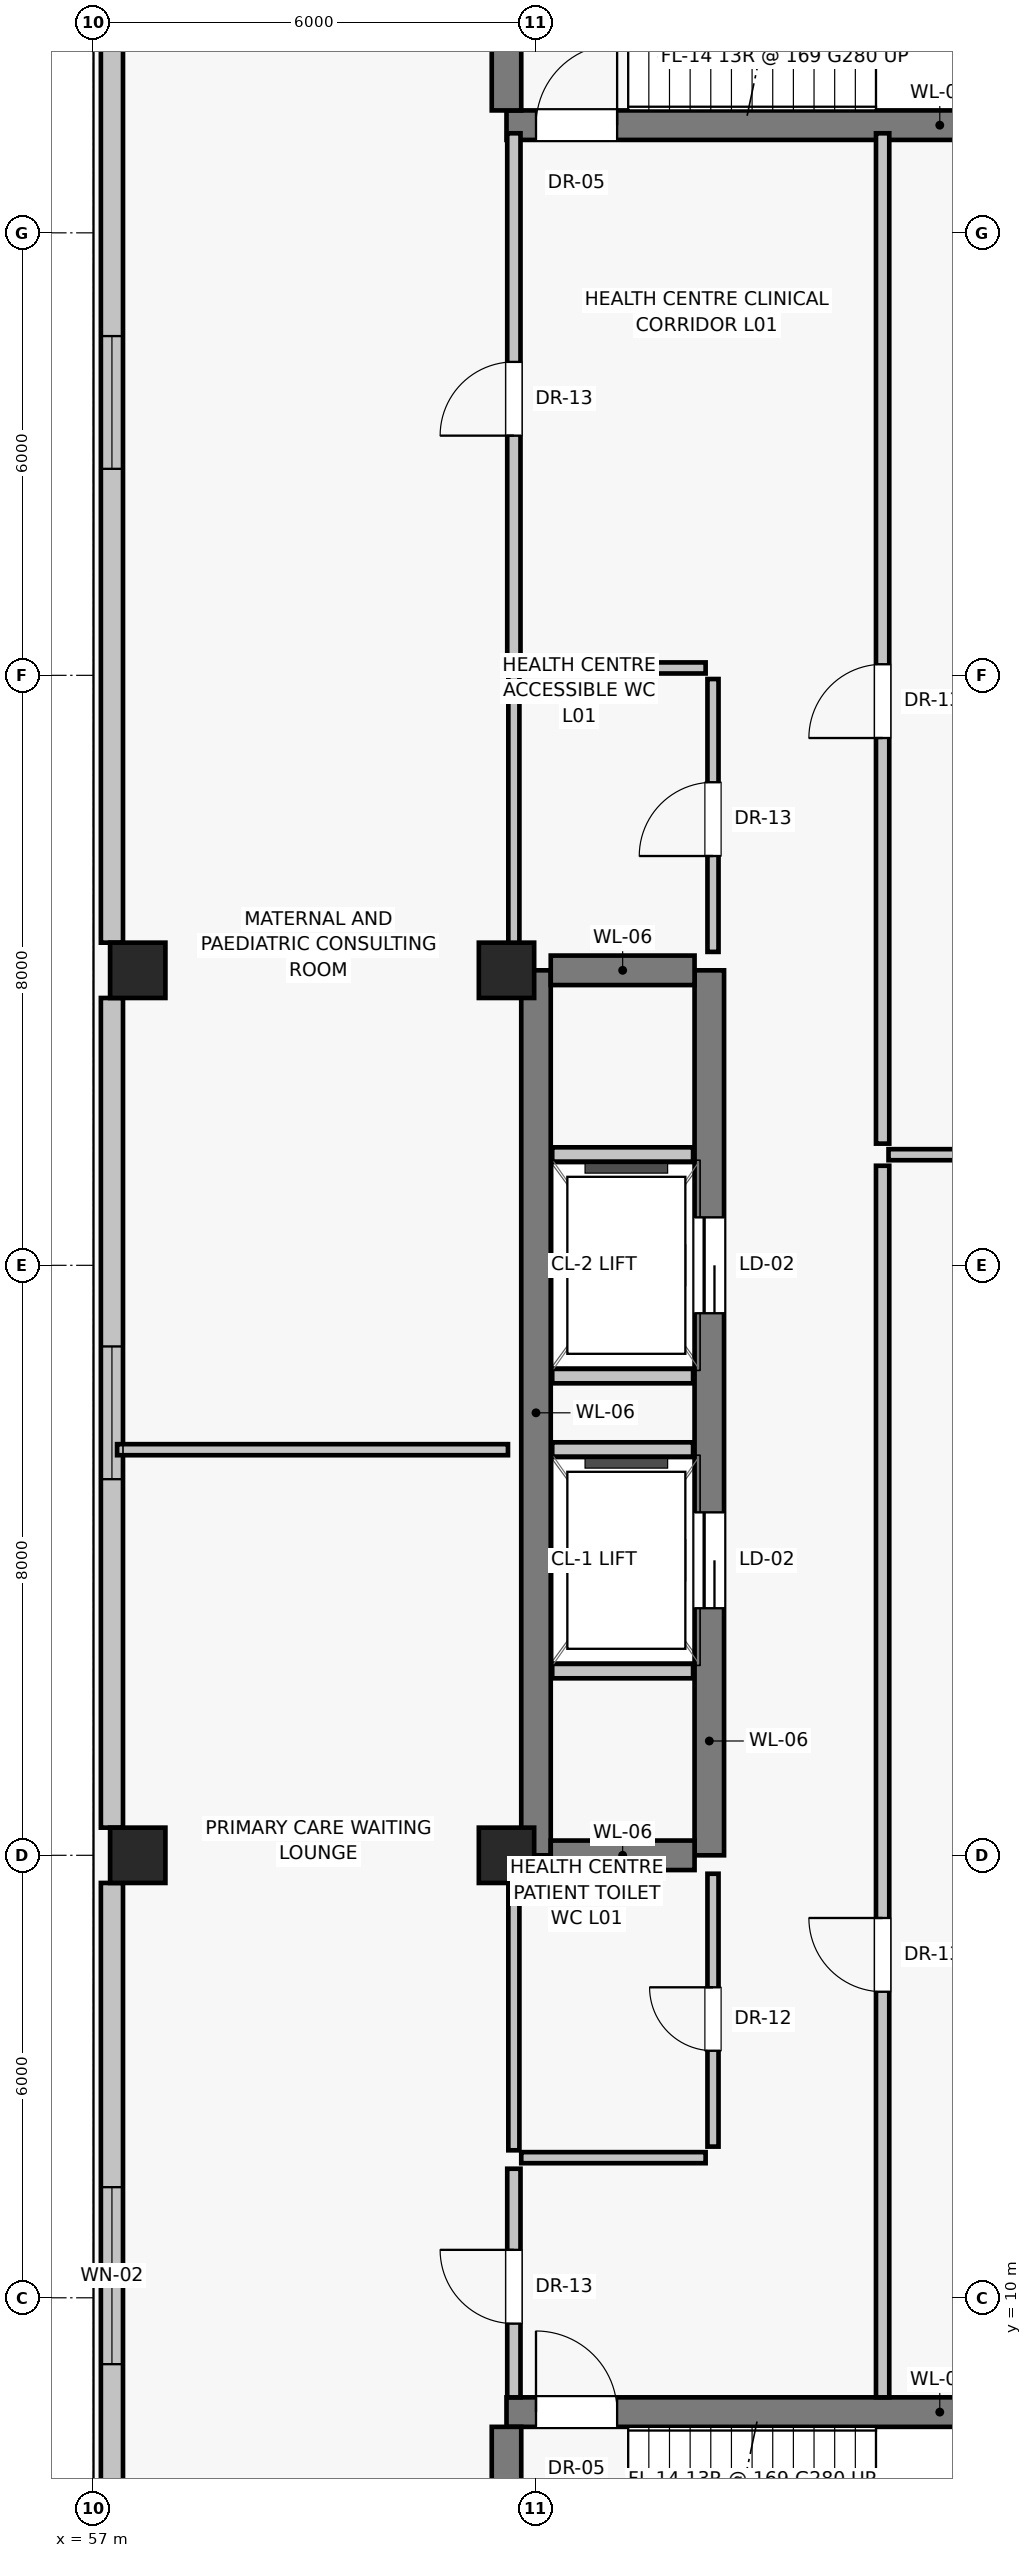
"""IFC4 building model, lengths in metres.
Left out: names, types, materials, properties, quantities, classifications, styles, units other than length and angle.
Written with IfcOpenShell. Run it as: python <this file> out.ifc"""

import sys

from ifc_helpers import new_model, si_unit, direction, frame, frame_2d, origin, origin_2d, place, context, subcontext, project, spatial, rectangle, extrude, source, transform, mapped, element, fill, save


model = new_model("IFC4")
c1 = context("Model", 3, precision=1e-05, world=origin(), true_north=direction((0.0, 1.0)))
c2 = subcontext(c1, "Body", "Model", "MODEL_VIEW")
j1 = project(units=[si_unit("LENGTHUNIT", "METRE"), si_unit("PLANEANGLEUNIT", "RADIAN")], contexts=[c1])
p1 = place(None, origin())
s1 = spatial("IfcSite", under=j1, at=p1, CompositionType="ELEMENT")
p2 = place(p1, origin())
s2 = spatial("IfcBuilding", under=s1, at=p2, CompositionType="ELEMENT")
p3 = place(p2, frame((0.0, 0.0, 5.2)))
s3 = spatial("IfcBuildingStorey", under=s2, at=p3, CompositionType="ELEMENT", Elevation=5.2)
for number, where, z_axis, x_axis in (
    (1, (57.6, 16.0, 0.0), (0.0, 0.0, 1.0), (1.0, 0.0, 0.0)),
    (2, (57.6, 28.0, 0.0), (0.0, 0.0, 1.0), (1.0, 0.0, 0.0)),
    (3, (62.6, 16.0, 0.0), (0.0, 0.0, 1.0), (1.0, 0.0, 0.0)),
    (4, (62.6, 28.0, 0.0), (0.0, 0.0, 1.0), (1.0, 0.0, 0.0)),
):
    element("IfcColumn", number, at=place(p3, frame(where, z_axis=z_axis, x_axis=x_axis)), inside=s3, PredefinedType="COLUMN", context=c2, shape_type="SweptSolid", body=[
        extrude(rectangle(XDim=0.75, YDim=0.75, at=origin_2d()), origin(), (0.0, 0.0, 1.0), 4.4),
    ])
p4 = place(p3, frame((57.25, 43.6, 0.0), z_axis=(0.0, 0.0, 1.0), x_axis=(0.0, -1.0, 0.0)))
e5 = element("IfcWall", 5, at=p4, inside=s3, PredefinedType="SOLIDWALL", context=c2, shape_type="SweptSolid", body=[
    extrude(rectangle(XDim=15.225, YDim=0.3, at=frame_2d((7.613, 0.0))), origin(), (0.0, 0.0, 1.0), 3.35),
])
p5 = place(p4, frame((7.0, 0.0, 0.85)))
e6 = element("IfcOpeningElement", 6, at=p5, cuts=e5, PredefinedType="OPENING", context=c2, shape_type="SweptSolid", body=[
    extrude(rectangle(XDim=1.8, YDim=1.65, at=frame_2d((0.9, 0.825))), frame((0.0, 0.16, 0.0), z_axis=(0.0, -1.0, 0.0), x_axis=(1.0, 0.0, 0.0)), (0.0, 0.0, 1.0), 0.32),
])
p6 = place(p3, frame((57.25, 27.625, 0.0), z_axis=(0.0, 0.0, 1.0), x_axis=(0.0, -1.0, 0.0)))
e7 = element("IfcWall", 7, at=p6, inside=s3, PredefinedType="SOLIDWALL", context=c2, shape_type="SweptSolid", body=[
    extrude(rectangle(XDim=11.25, YDim=0.3, at=frame_2d((5.625, 0.0))), origin(), (0.0, 0.0, 1.0), 3.35),
])
p7 = place(p6, frame((4.725, 0.0, 0.85)))
e8 = element("IfcOpeningElement", 8, at=p7, cuts=e7, PredefinedType="OPENING", context=c2, shape_type="SweptSolid", body=[
    extrude(rectangle(XDim=1.8, YDim=1.65, at=frame_2d((0.9, 0.825))), frame((0.0, 0.16, 0.0), z_axis=(0.0, -1.0, 0.0), x_axis=(1.0, 0.0, 0.0)), (0.0, 0.0, 1.0), 0.32),
])
p8 = place(p3, frame((57.25, 15.625, 0.0), z_axis=(0.0, 0.0, 1.0), x_axis=(0.0, -1.0, 0.0)))
e9 = element("IfcWall", 9, at=p8, inside=s3, PredefinedType="SOLIDWALL", context=c2, shape_type="SweptSolid", body=[
    extrude(rectangle(XDim=11.225, YDim=0.3, at=frame_2d((5.613, 0.0))), origin(), (0.0, 0.0, 1.0), 3.35),
])
p9 = place(p8, frame((4.125, 0.0, 0.85)))
e10 = element("IfcOpeningElement", 10, at=p9, cuts=e9, PredefinedType="OPENING", context=c2, shape_type="SweptSolid", body=[
    extrude(rectangle(XDim=2.4, YDim=1.8, at=frame_2d((1.2, 0.9))), frame((0.0, 0.16, 0.0), z_axis=(0.0, -1.0, 0.0), x_axis=(1.0, 0.0, 0.0)), (0.0, 0.0, 1.0), 0.32),
])
p10 = place(p3, frame((63.0, 16.0, 0.0), z_axis=(0.0, 0.0, 1.0), x_axis=(0.0, 1.0, 0.0)))
e11 = element("IfcWall", 11, at=p10, inside=s3, PredefinedType="SHEAR", context=c2, shape_type="SweptSolid", body=[
    extrude(rectangle(XDim=12.0, YDim=0.4, at=frame_2d((6.0, 0.0))), origin(), (0.0, 0.0, 1.0), 4.1),
])
p11 = place(p3, frame((65.35, 16.0, 0.0), z_axis=(0.0, 0.0, 1.0), x_axis=(0.0, 1.0, 0.0)))
e12 = element("IfcWall", 12, at=p11, inside=s3, PredefinedType="SHEAR", context=c2, shape_type="SweptSolid", body=[
    extrude(rectangle(XDim=12.0, YDim=0.4, at=frame_2d((6.0, 0.0))), origin(), (0.0, 0.0, 1.0), 4.1),
])
p12 = place(p11, frame((3.35, 0.0, 0.0)))
e13 = element("IfcOpeningElement", 13, at=p12, cuts=e12, PredefinedType="OPENING", context=c2, shape_type="SweptSolid", body=[
    extrude(rectangle(XDim=1.3, YDim=2.25, at=frame_2d((0.65, 1.125))), frame((0.0, 0.21, 0.0), z_axis=(0.0, -1.0, 0.0), x_axis=(1.0, 0.0, 0.0)), (0.0, 0.0, 1.0), 0.42),
])
p13 = place(p11, frame((7.35, 0.0, 0.0)))
e14 = element("IfcOpeningElement", 14, at=p13, cuts=e12, PredefinedType="OPENING", context=c2, shape_type="SweptSolid", body=[
    extrude(rectangle(XDim=1.3, YDim=2.25, at=frame_2d((0.65, 1.125))), frame((0.0, 0.21, 0.0), z_axis=(0.0, -1.0, 0.0), x_axis=(1.0, 0.0, 0.0)), (0.0, 0.0, 1.0), 0.42),
])
for number, where, z_axis, x_axis in (
    (15, (63.2, 16.0, 0.0), (0.0, 0.0, 1.0), (1.0, 0.0, 0.0)),
    (16, (63.2, 28.0, 0.0), (0.0, 0.0, 1.0), (1.0, 0.0, 0.0)),
):
    element("IfcWall", number, at=place(p3, frame(where, z_axis=z_axis, x_axis=x_axis)), inside=s3, PredefinedType="SHEAR", context=c2, shape_type="SweptSolid", body=[
        extrude(rectangle(XDim=1.95, YDim=0.4, at=frame_2d((0.975, 0.0))), origin(), (0.0, 0.0, 1.0), 4.1),
    ])
for number, where, z_axis, x_axis in (
    (17, (63.22, 18.5, 0.0), (0.0, 0.0, 1.0), (1.0, 0.0, 0.0)),
    (18, (63.22, 21.5, 0.0), (0.0, 0.0, 1.0), (1.0, 0.0, 0.0)),
    (19, (63.22, 22.5, 0.0), (0.0, 0.0, 1.0), (1.0, 0.0, 0.0)),
    (20, (63.22, 25.5, 0.0), (0.0, 0.0, 1.0), (1.0, 0.0, 0.0)),
):
    element("IfcWall", number, at=place(p3, frame(where, z_axis=z_axis, x_axis=x_axis)), inside=s3, PredefinedType="SOLIDWALL", context=c2, shape_type="SweptSolid", body=[
        extrude(rectangle(XDim=1.91, YDim=0.2, at=frame_2d((0.955, 0.0))), origin(), (0.0, 0.0, 1.0), 4.1),
    ])
p14 = place(p3, frame((62.6, 8.45, 0.0), z_axis=(0.0, 0.0, 1.0), x_axis=(1.0, 0.0, 0.0)))
e21 = element("IfcWall", 21, at=p14, inside=s3, PredefinedType="SHEAR", context=c2, shape_type="SweptSolid", body=[
    extrude(rectangle(XDim=10.0, YDim=0.4, at=frame_2d((5.0, 0.0))), origin(), (0.0, 0.0, 1.0), 4.1),
])
p15 = place(p14, frame((0.4, 0.0, 0.0)))
e22 = element("IfcOpeningElement", 22, at=p15, cuts=e21, PredefinedType="OPENING", context=c2, shape_type="SweptSolid", body=[
    extrude(rectangle(XDim=1.1, YDim=2.03, at=frame_2d((0.55, 1.015))), frame((0.0, 0.21, 0.0), z_axis=(0.0, -1.0, 0.0), x_axis=(1.0, 0.0, 0.0)), (0.0, 0.0, 1.0), 0.42),
])
p16 = place(p3, frame((62.6, 5.2, 0.0), z_axis=(0.0, 0.0, 1.0), x_axis=(0.0, 1.0, 0.0)))
e23 = element("IfcWall", 23, at=p16, inside=s3, PredefinedType="SHEAR", context=c2, shape_type="SweptSolid", body=[
    extrude(rectangle(XDim=3.05, YDim=0.4, at=frame_2d((1.525, 0.0))), origin(), (0.0, 0.0, 1.0), 4.1),
])
p17 = place(p3, frame((62.6, 39.46, 0.0), z_axis=(0.0, 0.0, 1.0), x_axis=(1.0, 0.0, 0.0)))
e24 = element("IfcWall", 24, at=p17, inside=s3, PredefinedType="SHEAR", context=c2, shape_type="SweptSolid", body=[
    extrude(rectangle(XDim=10.0, YDim=0.4, at=frame_2d((5.0, 0.0))), origin(), (0.0, 0.0, 1.0), 4.1),
])
p18 = place(p17, frame((0.4, 0.0, 0.0)))
e25 = element("IfcOpeningElement", 25, at=p18, cuts=e24, PredefinedType="OPENING", context=c2, shape_type="SweptSolid", body=[
    extrude(rectangle(XDim=1.1, YDim=2.03, at=frame_2d((0.55, 1.015))), frame((0.0, 0.21, 0.0), z_axis=(0.0, -1.0, 0.0), x_axis=(1.0, 0.0, 0.0)), (0.0, 0.0, 1.0), 0.42),
])
p19 = place(p3, frame((62.6, 39.66, 0.0), z_axis=(0.0, 0.0, 1.0), x_axis=(0.0, 1.0, 0.0)))
e26 = element("IfcWall", 26, at=p19, inside=s3, PredefinedType="SHEAR", context=c2, shape_type="SweptSolid", body=[
    extrude(rectangle(XDim=3.05, YDim=0.4, at=frame_2d((1.525, 0.0))), origin(), (0.0, 0.0, 1.0), 4.1),
])
p20 = place(p3, frame((62.8, 11.9, 0.0), z_axis=(0.0, 0.0, 1.0), x_axis=(1.0, 0.0, 0.0)))
e27 = element("IfcWall", 27, at=p20, inside=s3, PredefinedType="PARTITIONING", context=c2, shape_type="SweptSolid", body=[
    extrude(rectangle(XDim=2.5, YDim=0.15, at=frame_2d((1.25, 0.0))), origin(), (0.0, 0.0, 1.0), 4.1),
])
p21 = place(p3, frame((62.7, 12.0, 0.0), z_axis=(0.0, 0.0, 1.0), x_axis=(0.0, 1.0, 0.0)))
e28 = element("IfcWall", 28, at=p21, inside=s3, PredefinedType="PARTITIONING", context=c2, shape_type="SweptSolid", body=[
    extrude(rectangle(XDim=3.8, YDim=0.15, at=frame_2d((1.9, 0.0))), origin(), (0.0, 0.0, 1.0), 3.5),
])
p22 = place(p3, frame((65.4, 12.05, 0.0), z_axis=(0.0, 0.0, 1.0), x_axis=(0.0, 1.0, 0.0)))
e29 = element("IfcWall", 29, at=p22, inside=s3, PredefinedType="PARTITIONING", context=c2, shape_type="SweptSolid", body=[
    extrude(rectangle(XDim=3.7, YDim=0.15, at=frame_2d((1.85, 0.0))), origin(), (0.0, 0.0, 1.0), 4.1),
])
p23 = place(p22, frame((1.3, 0.0, 0.0)))
e30 = element("IfcOpeningElement", 30, at=p23, cuts=e29, PredefinedType="OPENING", context=c2, shape_type="SweptSolid", body=[
    extrude(rectangle(XDim=0.86, YDim=2.01, at=frame_2d((0.43, 1.005))), frame((0.0, 0.085, 0.0), z_axis=(0.0, -1.0, 0.0), x_axis=(1.0, 0.0, 0.0)), (0.0, 0.0, 1.0), 0.17),
])
p24 = place(p3, frame((62.8, 32.1, 0.0), z_axis=(0.0, 0.0, 1.0), x_axis=(1.0, 0.0, 0.0)))
e31 = element("IfcWall", 31, at=p24, inside=s3, PredefinedType="PARTITIONING", context=c2, shape_type="SweptSolid", body=[
    extrude(rectangle(XDim=2.5, YDim=0.15, at=frame_2d((1.25, 0.0))), origin(), (0.0, 0.0, 1.0), 4.1),
])
p25 = place(p3, frame((62.7, 28.2, 0.0), z_axis=(0.0, 0.0, 1.0), x_axis=(0.0, 1.0, 0.0)))
e32 = element("IfcWall", 32, at=p25, inside=s3, PredefinedType="PARTITIONING", context=c2, shape_type="SweptSolid", body=[
    extrude(rectangle(XDim=3.8, YDim=0.15, at=frame_2d((1.9, 0.0))), origin(), (0.0, 0.0, 1.0), 3.5),
])
p26 = place(p3, frame((65.4, 28.25, 0.0), z_axis=(0.0, 0.0, 1.0), x_axis=(0.0, 1.0, 0.0)))
e33 = element("IfcWall", 33, at=p26, inside=s3, PredefinedType="PARTITIONING", context=c2, shape_type="SweptSolid", body=[
    extrude(rectangle(XDim=3.7, YDim=0.15, at=frame_2d((1.85, 0.0))), origin(), (0.0, 0.0, 1.0), 4.1),
])
p27 = place(p26, frame((1.3, 0.0, 0.0)))
e34 = element("IfcOpeningElement", 34, at=p27, cuts=e33, PredefinedType="OPENING", context=c2, shape_type="SweptSolid", body=[
    extrude(rectangle(XDim=1.0, YDim=2.01, at=frame_2d((0.5, 1.005))), frame((0.0, 0.085, 0.0), z_axis=(0.0, -1.0, 0.0), x_axis=(1.0, 0.0, 0.0)), (0.0, 0.0, 1.0), 0.17),
])
p28 = place(p3, frame((62.7, 8.65, 0.0), z_axis=(0.0, 0.0, 1.0), x_axis=(0.0, 1.0, 0.0)))
e35 = element("IfcWall", 35, at=p28, inside=s3, PredefinedType="PARTITIONING", context=c2, shape_type="SweptSolid", body=[
    extrude(rectangle(XDim=3.1, YDim=0.18, at=frame_2d((1.55, 0.0))), origin(), (0.0, 0.0, 1.0), 3.5),
])
p29 = place(p28, frame((1.0, 0.0, 0.0)))
e36 = element("IfcOpeningElement", 36, at=p29, cuts=e35, PredefinedType="OPENING", context=c2, shape_type="SweptSolid", body=[
    extrude(rectangle(XDim=1.0, YDim=2.01, at=frame_2d((0.5, 1.005))), frame((0.0, 0.1, 0.0), z_axis=(0.0, -1.0, 0.0), x_axis=(1.0, 0.0, 0.0)), (0.0, 0.0, 1.0), 0.2),
])
p30 = place(p3, frame((62.7, 32.25, 0.0), z_axis=(0.0, 0.0, 1.0), x_axis=(0.0, 1.0, 0.0)))
e37 = element("IfcWall", 37, at=p30, inside=s3, PredefinedType="PARTITIONING", context=c2, shape_type="SweptSolid", body=[
    extrude(rectangle(XDim=7.1, YDim=0.18, at=frame_2d((3.55, 0.0))), origin(), (0.0, 0.0, 1.0), 3.5),
])
p31 = place(p30, frame((3.0, 0.0, 0.0)))
e38 = element("IfcOpeningElement", 38, at=p31, cuts=e37, PredefinedType="OPENING", context=c2, shape_type="SweptSolid", body=[
    extrude(rectangle(XDim=1.0, YDim=2.01, at=frame_2d((0.5, 1.005))), frame((0.0, 0.1, 0.0), z_axis=(0.0, -1.0, 0.0), x_axis=(1.0, 0.0, 0.0)), (0.0, 0.0, 1.0), 0.2),
])
p32 = place(p3, frame((57.32, 21.5, 0.0), z_axis=(0.0, 0.0, 1.0), x_axis=(1.0, 0.0, 0.0)))
e39 = element("IfcWall", 39, at=p32, inside=s3, PredefinedType="PARTITIONING", context=c2, shape_type="SweptSolid", body=[
    extrude(rectangle(XDim=5.3, YDim=0.15, at=frame_2d((2.65, 0.0))), origin(), (0.0, 0.0, 1.0), 4.1),
])
p33 = place(p3, frame((67.7, 8.65, 0.0), z_axis=(0.0, 0.0, 1.0), x_axis=(0.0, 1.0, 0.0)))
e40 = element("IfcWall", 40, at=p33, inside=s3, PredefinedType="PARTITIONING", context=c2, shape_type="SweptSolid", body=[
    extrude(rectangle(XDim=16.7, YDim=0.18, at=frame_2d((8.35, 0.0))), origin(), (0.0, 0.0, 1.0), 4.1),
])
p34 = place(p33, frame((5.5, 0.0, 0.0)))
e41 = element("IfcOpeningElement", 41, at=p34, cuts=e40, PredefinedType="OPENING", context=c2, shape_type="SweptSolid", body=[
    extrude(rectangle(XDim=1.0, YDim=2.01, at=frame_2d((0.5, 1.005))), frame((0.0, 0.1, 0.0), z_axis=(0.0, -1.0, 0.0), x_axis=(1.0, 0.0, 0.0)), (0.0, 0.0, 1.0), 0.2),
])
p35 = place(p3, frame((67.7, 25.65, 0.0), z_axis=(0.0, 0.0, 1.0), x_axis=(0.0, 1.0, 0.0)))
e42 = element("IfcWall", 42, at=p35, inside=s3, PredefinedType="PARTITIONING", context=c2, shape_type="SweptSolid", body=[
    extrude(rectangle(XDim=13.7, YDim=0.18, at=frame_2d((6.85, 0.0))), origin(), (0.0, 0.0, 1.0), 4.1),
])
p36 = place(p35, frame((5.5, 0.0, 0.0)))
e43 = element("IfcOpeningElement", 43, at=p36, cuts=e42, PredefinedType="OPENING", context=c2, shape_type="SweptSolid", body=[
    extrude(rectangle(XDim=1.0, YDim=2.01, at=frame_2d((0.5, 1.005))), frame((0.0, 0.1, 0.0), z_axis=(0.0, -1.0, 0.0), x_axis=(1.0, 0.0, 0.0)), (0.0, 0.0, 1.0), 0.2),
])
p37 = place(p3, frame((67.78, 25.5, 0.0), z_axis=(0.0, 0.0, 1.0), x_axis=(1.0, 0.0, 0.0)))
e44 = element("IfcWall", 44, at=p37, inside=s3, PredefinedType="PARTITIONING", context=c2, shape_type="SweptSolid", body=[
    extrude(rectangle(XDim=6.9, YDim=0.15, at=frame_2d((3.45, 0.0))), origin(), (0.0, 0.0, 1.0), 4.1),
])
m1 = source(origin(), c2, "Body", "SweptSolid", [
    extrude(rectangle(XDim=1.8, YDim=1.65, at=frame_2d((0.9, 0.825))), frame((0.0, 0.03, 0.0), z_axis=(0.0, -1.0, 0.0), x_axis=(1.0, 0.0, 0.0)), (0.0, 0.0, 1.0), 0.06),
])
p38 = place(p5, origin())
e45 = element("IfcWindow", 45, at=p38, inside=s3, PartitioningType="DOUBLE_PANEL_VERTICAL", PredefinedType="WINDOW", context=c2, shape_type="MappedRepresentation", body=[
    mapped(m1, transform((0.0, 0.0, 0.0), scale=1.0)),
])
fill(e6, e45)
p39 = place(p7, origin())
e46 = element("IfcWindow", 46, at=p39, inside=s3, PartitioningType="DOUBLE_PANEL_VERTICAL", PredefinedType="WINDOW", context=c2, shape_type="MappedRepresentation", body=[
    mapped(m1, transform((0.0, 0.0, 0.0), scale=1.0)),
])
fill(e8, e46)
m2 = source(origin(), c2, "Body", "SweptSolid", [
    extrude(rectangle(XDim=2.4, YDim=1.8, at=frame_2d((1.2, 0.9))), frame((0.0, 0.03, 0.0), z_axis=(0.0, -1.0, 0.0), x_axis=(1.0, 0.0, 0.0)), (0.0, 0.0, 1.0), 0.06),
])
p40 = place(p9, origin())
e47 = element("IfcWindow", 47, at=p40, inside=s3, PartitioningType="SINGLE_PANEL", PredefinedType="WINDOW", context=c2, shape_type="MappedRepresentation", body=[
    mapped(m2, transform((0.0, 0.0, 0.0), scale=1.0)),
])
fill(e10, e47)
m3 = source(origin(), c2, "Body", "SweptSolid", [
    extrude(rectangle(XDim=1.3, YDim=2.25, at=frame_2d((0.65, 1.125))), frame((0.0, 0.025, 0.0), z_axis=(0.0, -1.0, 0.0), x_axis=(1.0, 0.0, 0.0)), (0.0, 0.0, 1.0), 0.05),
])
p41 = place(p12, origin())
e48 = element("IfcDoor", 48, at=p41, inside=s3, OperationType="SLIDING_TO_LEFT", PredefinedType="DOOR", context=c2, shape_type="MappedRepresentation", body=[
    mapped(m3, transform((0.0, 0.0, 0.0), scale=1.0)),
])
fill(e13, e48)
p42 = place(p13, origin())
e49 = element("IfcDoor", 49, at=p42, inside=s3, OperationType="SLIDING_TO_LEFT", PredefinedType="DOOR", context=c2, shape_type="MappedRepresentation", body=[
    mapped(m3, transform((0.0, 0.0, 0.0), scale=1.0)),
])
fill(e14, e49)
m4 = source(origin(), c2, "Body", "SweptSolid", [
    extrude(rectangle(XDim=1.1, YDim=2.03, at=frame_2d((0.55, 1.015))), frame((0.0, 0.025, 0.0), z_axis=(0.0, -1.0, 0.0), x_axis=(1.0, 0.0, 0.0)), (0.0, 0.0, 1.0), 0.05),
])
p43 = place(p15, origin())
e50 = element("IfcDoor", 50, at=p43, inside=s3, OperationType="SINGLE_SWING_LEFT", PredefinedType="DOOR", context=c2, shape_type="MappedRepresentation", body=[
    mapped(m4, transform((0.0, 0.0, 0.0), scale=1.0)),
])
fill(e22, e50)
p44 = place(p18, origin())
e51 = element("IfcDoor", 51, at=p44, inside=s3, OperationType="SINGLE_SWING_RIGHT", PredefinedType="DOOR", context=c2, shape_type="MappedRepresentation", body=[
    mapped(m4, transform((0.0, 0.0, 0.0), scale=1.0)),
])
fill(e25, e51)
m5 = source(origin(), c2, "Body", "SweptSolid", [
    extrude(rectangle(XDim=0.86, YDim=2.01, at=frame_2d((0.43, 1.005))), frame((0.0, 0.025, 0.0), z_axis=(0.0, -1.0, 0.0), x_axis=(1.0, 0.0, 0.0)), (0.0, 0.0, 1.0), 0.05),
])
p45 = place(p23, origin())
e52 = element("IfcDoor", 52, at=p45, inside=s3, OperationType="SINGLE_SWING_RIGHT", PredefinedType="DOOR", context=c2, shape_type="MappedRepresentation", body=[
    mapped(m5, transform((0.0, 0.0, 0.0), scale=1.0)),
])
fill(e30, e52)
m6 = source(origin(), c2, "Body", "SweptSolid", [
    extrude(rectangle(XDim=1.0, YDim=2.01, at=frame_2d((0.5, 1.005))), frame((0.0, 0.025, 0.0), z_axis=(0.0, -1.0, 0.0), x_axis=(1.0, 0.0, 0.0)), (0.0, 0.0, 1.0), 0.05),
])
p46 = place(p27, origin())
e53 = element("IfcDoor", 53, at=p46, inside=s3, OperationType="SINGLE_SWING_LEFT", PredefinedType="DOOR", context=c2, shape_type="MappedRepresentation", body=[
    mapped(m6, transform((0.0, 0.0, 0.0), scale=1.0)),
])
fill(e34, e53)
p47 = place(p29, origin())
e54 = element("IfcDoor", 54, at=p47, inside=s3, OperationType="SINGLE_SWING_RIGHT", PredefinedType="DOOR", context=c2, shape_type="MappedRepresentation", body=[
    mapped(m6, transform((0.0, 0.0, 0.0), scale=1.0)),
])
fill(e36, e54)
p48 = place(p31, origin())
e55 = element("IfcDoor", 55, at=p48, inside=s3, OperationType="SINGLE_SWING_LEFT", PredefinedType="DOOR", context=c2, shape_type="MappedRepresentation", body=[
    mapped(m6, transform((0.0, 0.0, 0.0), scale=1.0)),
])
fill(e38, e55)
p49 = place(p34, origin())
e56 = element("IfcDoor", 56, at=p49, inside=s3, OperationType="SINGLE_SWING_RIGHT", PredefinedType="DOOR", context=c2, shape_type="MappedRepresentation", body=[
    mapped(m6, transform((0.0, 0.0, 0.0), scale=1.0)),
])
fill(e41, e56)
p50 = place(p36, origin())
e57 = element("IfcDoor", 57, at=p50, inside=s3, OperationType="SINGLE_SWING_LEFT", PredefinedType="DOOR", context=c2, shape_type="MappedRepresentation", body=[
    mapped(m6, transform((0.0, 0.0, 0.0), scale=1.0)),
])
fill(e43, e57)
save(model, sys.argv[1])
